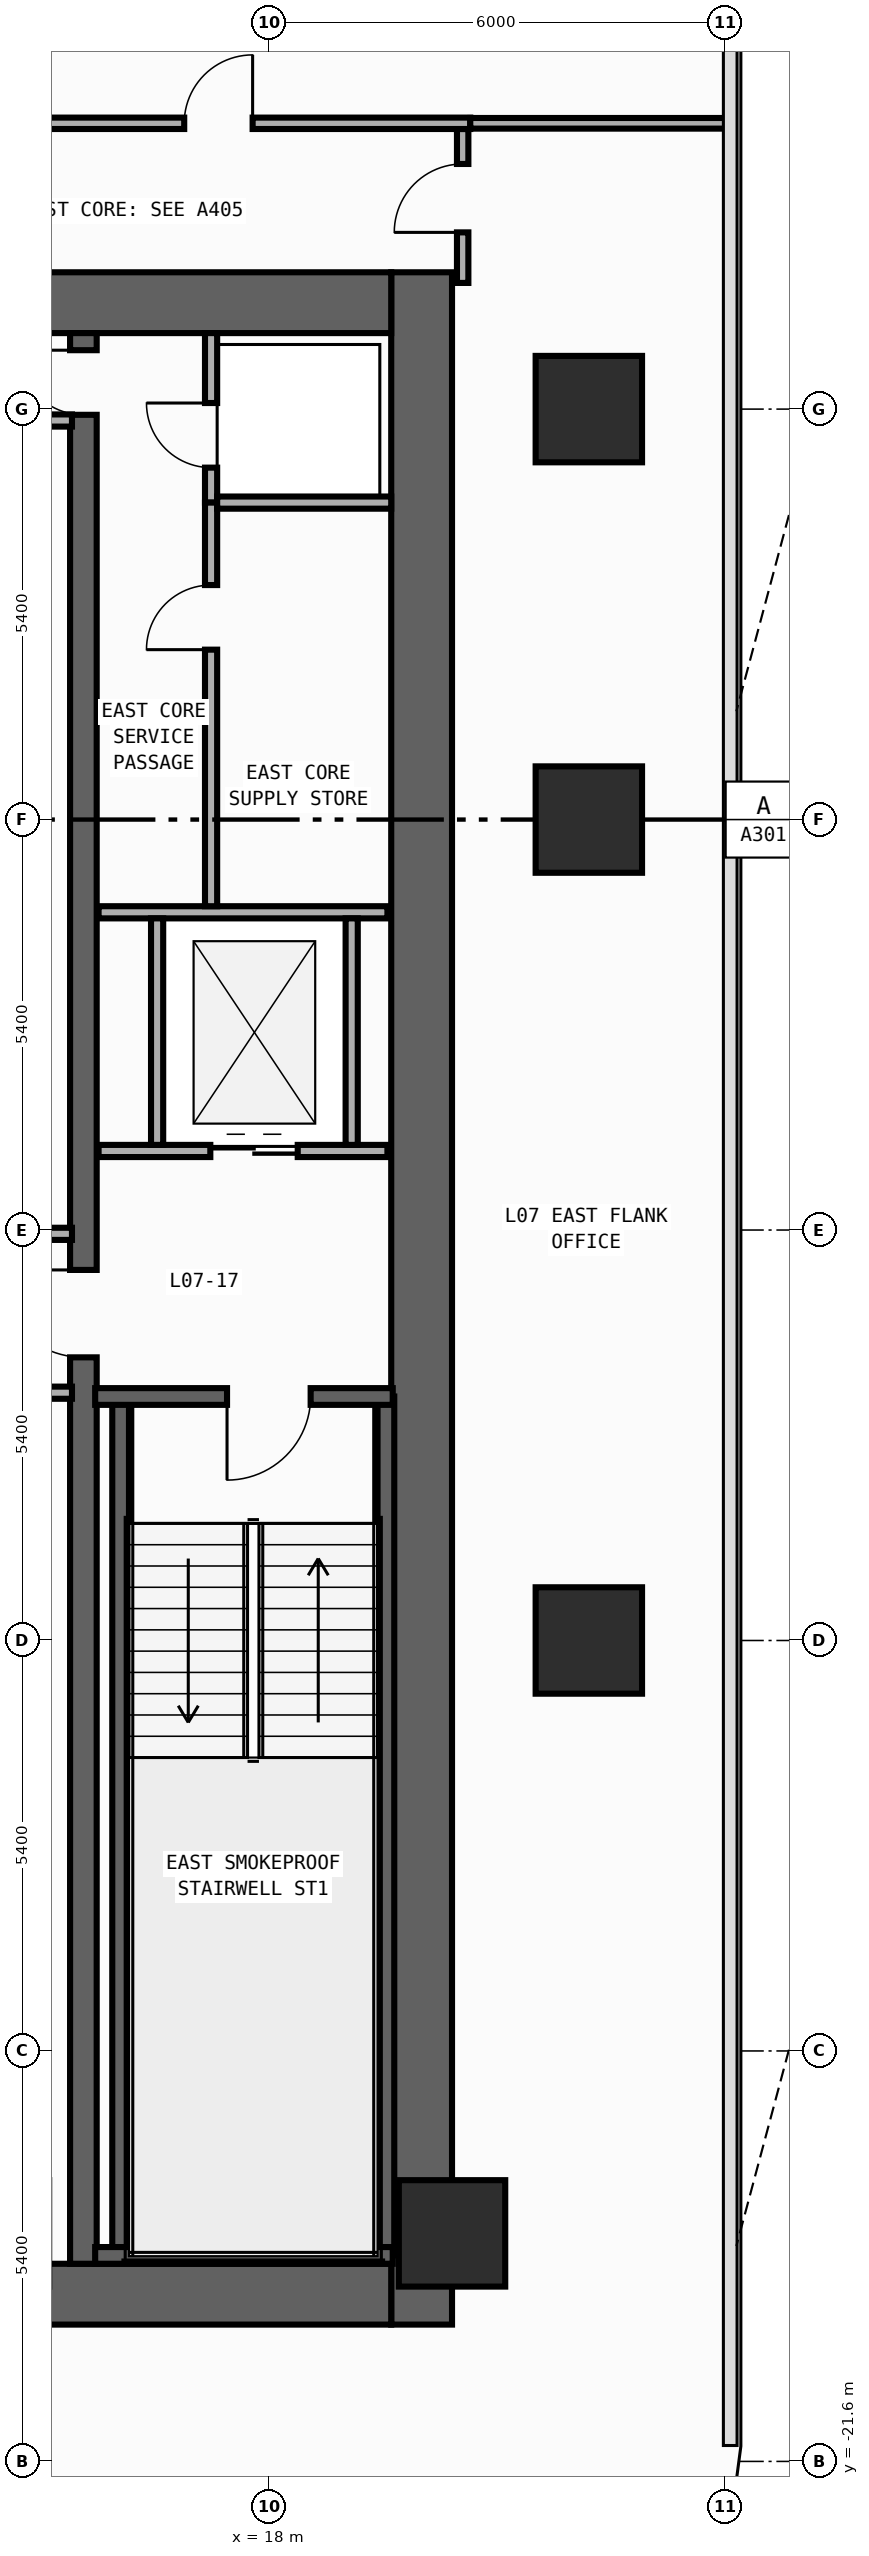
"""IFC4 building model, lengths in metres.
Left out: names, types, materials, properties, quantities, classifications, styles, units other than length and angle.
Written with IfcOpenShell. Run it as: python <this file> out.ifc"""

import sys

from ifc_helpers import new_model, si_unit, direction, frame, frame_2d, origin, origin_2d, place, context, subcontext, project, spatial, rectangle, extrude, element, fill, save


model = new_model("IFC4")
c1 = context("Model", 3, precision=1e-05, world=origin(), true_north=direction((0.0, 1.0)))
c2 = subcontext(c1, "Body", "Model", "MODEL_VIEW")
j1 = project(units=[si_unit("LENGTHUNIT", "METRE"), si_unit("PLANEANGLEUNIT", "RADIAN")], contexts=[c1])
p1 = place(None, origin())
s1 = spatial("IfcSite", under=j1, at=p1, CompositionType="ELEMENT")
p2 = place(p1, origin())
s2 = spatial("IfcBuilding", under=s1, at=p2, CompositionType="ELEMENT")
p3 = place(p2, frame((0.0, 0.0, 30.2)))
s3 = spatial("IfcBuildingStorey", under=s2, at=p3, CompositionType="ELEMENT", Elevation=30.2)
p4 = place(p3, frame((20.0, -19.8, 0.0), z_axis=(0.0, 0.0, 1.0), x_axis=(0.0, 1.0, 0.0)))
e1 = element("IfcWall", 1, at=p4, inside=s3, PredefinedType="SHEAR", context=c2, shape_type="SweptSolid", body=[
    extrude(rectangle(XDim=27.0, YDim=0.8, at=frame_2d((13.5, 0.0))), origin(), (0.0, 0.0, 1.0), 3.94),
])
for number, where, z_axis, x_axis in (
    (2, (12.8, -19.4, 0.0), (0.0, 0.0, 1.0), (1.0, 0.0, 0.0)),
    (3, (12.8, 6.8, 0.0), (0.0, 0.0, 1.0), (1.0, 0.0, 0.0)),
):
    element("IfcWall", number, at=place(p3, frame(where, z_axis=z_axis, x_axis=x_axis)), inside=s3, PredefinedType="SHEAR", context=c2, shape_type="SweptSolid", body=[
        extrude(rectangle(XDim=6.8, YDim=0.8, at=frame_2d((3.4, 0.0))), origin(), (0.0, 0.0, 1.0), 3.94),
    ])
p5 = place(p3, frame((15.55, -19.0, 0.0), z_axis=(0.0, 0.0, 1.0), x_axis=(0.0, 1.0, 0.0)))
e4 = element("IfcWall", 4, at=p5, inside=s3, PredefinedType="SHEAR", context=c2, shape_type="SweptSolid", body=[
    extrude(rectangle(XDim=25.4, YDim=0.35, at=frame_2d((12.7, 0.0))), origin(), (0.0, 0.0, 1.0), 3.94),
])
p6 = place(p5, frame((11.925, 0.0, 0.0)))
e5 = element("IfcOpeningElement", 5, at=p6, cuts=e4, PredefinedType="OPENING", context=c2, shape_type="SweptSolid", body=[
    extrude(rectangle(XDim=1.15, YDim=2.2, at=frame_2d((0.575, 1.1))), frame((0.0, 0.185, 0.0), z_axis=(0.0, -1.0, 0.0), x_axis=(1.0, 0.0, 0.0)), (0.0, 0.0, 1.0), 0.37),
])
p7 = place(p5, frame((24.325, 0.0, 0.0)))
e6 = element("IfcOpeningElement", 6, at=p7, cuts=e4, PredefinedType="OPENING", context=c2, shape_type="SweptSolid", body=[
    extrude(rectangle(XDim=0.85, YDim=2.1, at=frame_2d((0.425, 1.05))), frame((0.0, 0.185, 0.0), z_axis=(0.0, -1.0, 0.0), x_axis=(1.0, 0.0, 0.0)), (0.0, 0.0, 1.0), 0.37),
])
for number, where, z_axis, x_axis in (
    (7, (16.04, -18.89, 0.0), (0.0, 0.0, 1.0), (0.0, 1.0, 0.0)),
    (8, (19.53, -18.89, 0.0), (0.0, 0.0, 1.0), (0.0, 1.0, 0.0)),
):
    element("IfcWall", number, at=place(p3, frame(where, z_axis=z_axis, x_axis=x_axis)), inside=s3, PredefinedType="SHEAR", context=c2, shape_type="SweptSolid", body=[
        extrude(rectangle(XDim=11.3, YDim=0.22, at=frame_2d((5.65, 0.0))), origin(), (0.0, 0.0, 1.0), 3.94),
    ])
p8 = place(p3, frame((15.705, -18.89, 0.0), z_axis=(0.0, 0.0, 1.0), x_axis=(1.0, 0.0, 0.0)))
e9 = element("IfcWall", 9, at=p8, inside=s3, PredefinedType="SHEAR", context=c2, shape_type="SweptSolid", body=[
    extrude(rectangle(XDim=3.915, YDim=0.22, at=frame_2d((1.958, 0.0))), origin(), (0.0, 0.0, 1.0), 3.94),
])
p9 = place(p3, frame((19.62, -7.59, 0.0), z_axis=(0.0, 0.0, 1.0), x_axis=(-1.0, 0.0, 0.0)))
e10 = element("IfcWall", 10, at=p9, inside=s3, PredefinedType="SHEAR", context=c2, shape_type="SweptSolid", body=[
    extrude(rectangle(XDim=3.915, YDim=0.22, at=frame_2d((1.958, 0.0))), origin(), (0.0, 0.0, 1.0), 3.94),
])
p10 = place(p9, frame((1.08, 0.0, 0.0)))
e11 = element("IfcOpeningElement", 11, at=p10, cuts=e10, PredefinedType="OPENING", context=c2, shape_type="SweptSolid", body=[
    extrude(rectangle(XDim=1.1, YDim=2.2, at=frame_2d((0.55, 1.1))), frame((0.0, 0.12, 0.0), z_axis=(0.0, -1.0, 0.0), x_axis=(1.0, 0.0, 0.0)), (0.0, 0.0, 1.0), 0.24),
])
for number, where, z_axis, x_axis in (
    (12, (20.4, -18.6, 0.0), (0.0, 0.0, 1.0), (1.0, 0.0, 0.0)),
    (13, (22.2, -10.8, 0.0), (0.0, 0.0, 1.0), (1.0, 0.0, 0.0)),
    (14, (22.2, 0.0, 0.0), (0.0, 0.0, 1.0), (1.0, 0.0, 0.0)),
    (15, (22.2, 5.4, 0.0), (0.0, 0.0, 1.0), (1.0, 0.0, 0.0)),
):
    element("IfcColumn", number, at=place(p3, frame(where, z_axis=z_axis, x_axis=x_axis)), inside=s3, PredefinedType="COLUMN", context=c2, shape_type="SweptSolid", body=[
        extrude(rectangle(XDim=1.4, YDim=1.4, at=origin_2d()), origin(), (0.0, 0.0, 1.0), 4.2),
    ])
p11 = place(p3, frame((15.75, -4.36, 0.0), z_axis=(0.0, 0.0, 1.0), x_axis=(1.0, 0.0, 0.0)))
e16 = element("IfcWall", 16, at=p11, inside=s3, PredefinedType="STANDARD", context=c2, shape_type="SweptSolid", body=[
    extrude(rectangle(XDim=3.8, YDim=0.16, at=frame_2d((1.9, 0.0))), origin(), (0.0, 0.0, 1.0), 3.94),
])
p12 = place(p11, frame((1.47, 0.0, 0.0)))
e17 = element("IfcOpeningElement", 17, at=p12, cuts=e16, PredefinedType="OPENING", context=c2, shape_type="SweptSolid", body=[
    extrude(rectangle(XDim=1.15, YDim=2.2, at=frame_2d((0.575, 1.1))), frame((0.0, 0.09, 0.0), z_axis=(0.0, -1.0, 0.0), x_axis=(1.0, 0.0, 0.0)), (0.0, 0.0, 1.0), 0.18),
])
p13 = place(p3, frame((15.75, -1.22, 0.0), z_axis=(0.0, 0.0, 1.0), x_axis=(1.0, 0.0, 0.0)))
e18 = element("IfcWall", 18, at=p13, inside=s3, PredefinedType="STANDARD", context=c2, shape_type="SweptSolid", body=[
    extrude(rectangle(XDim=3.8, YDim=0.16, at=frame_2d((1.9, 0.0))), origin(), (0.0, 0.0, 1.0), 3.94),
])
for number, where, z_axis, x_axis in (
    (19, (16.52, -4.28, 0.0), (0.0, 0.0, 1.0), (0.0, 1.0, 0.0)),
    (20, (19.08, -4.28, 0.0), (0.0, 0.0, 1.0), (0.0, 1.0, 0.0)),
):
    element("IfcWall", number, at=place(p3, frame(where, z_axis=z_axis, x_axis=x_axis)), inside=s3, PredefinedType="STANDARD", context=c2, shape_type="SweptSolid", body=[
        extrude(rectangle(XDim=2.98, YDim=0.16, at=frame_2d((1.49, 0.0))), origin(), (0.0, 0.0, 1.0), 3.94),
    ])
for number, where, z_axis, x_axis in (
    (21, (12.8, -5.45, 0.0), (0.0, 0.0, 1.0), (1.0, 0.0, 0.0)),
    (22, (12.8, -7.54, 0.0), (0.0, 0.0, 1.0), (1.0, 0.0, 0.0)),
    (23, (12.8, 5.25, 0.0), (0.0, 0.0, 1.0), (1.0, 0.0, 0.0)),
):
    element("IfcWall", number, at=place(p3, frame(where, z_axis=z_axis, x_axis=x_axis)), inside=s3, PredefinedType="STANDARD", context=c2, shape_type="SweptSolid", body=[
        extrude(rectangle(XDim=2.6, YDim=0.16, at=frame_2d((1.3, 0.0))), origin(), (0.0, 0.0, 1.0), 3.94),
    ])
p14 = place(p3, frame((17.23, 4.17, 0.0), z_axis=(0.0, 0.0, 1.0), x_axis=(0.0, 1.0, 0.0)))
e24 = element("IfcWall", 24, at=p14, inside=s3, PredefinedType="PARTITIONING", context=c2, shape_type="SweptSolid", body=[
    extrude(rectangle(XDim=2.23, YDim=0.16, at=frame_2d((1.115, 0.0))), origin(), (0.0, 0.0, 1.0), 3.94),
])
p15 = place(p14, frame((0.46, 0.0, 0.0)))
e25 = element("IfcOpeningElement", 25, at=p15, cuts=e24, PredefinedType="OPENING", context=c2, shape_type="SweptSolid", body=[
    extrude(rectangle(XDim=0.85, YDim=2.1, at=frame_2d((0.425, 1.05))), frame((0.0, 0.09, 0.0), z_axis=(0.0, -1.0, 0.0), x_axis=(1.0, 0.0, 0.0)), (0.0, 0.0, 1.0), 0.18),
])
p16 = place(p3, frame((17.23, -1.14, 0.0), z_axis=(0.0, 0.0, 1.0), x_axis=(0.0, 1.0, 0.0)))
e26 = element("IfcWall", 26, at=p16, inside=s3, PredefinedType="PARTITIONING", context=c2, shape_type="SweptSolid", body=[
    extrude(rectangle(XDim=5.31, YDim=0.16, at=frame_2d((2.655, 0.0))), origin(), (0.0, 0.0, 1.0), 3.94),
])
p17 = place(p16, frame((3.375, 0.0, 0.0)))
e27 = element("IfcOpeningElement", 27, at=p17, cuts=e26, PredefinedType="OPENING", context=c2, shape_type="SweptSolid", body=[
    extrude(rectangle(XDim=0.85, YDim=2.1, at=frame_2d((0.425, 1.05))), frame((0.0, 0.09, 0.0), z_axis=(0.0, -1.0, 0.0), x_axis=(1.0, 0.0, 0.0)), (0.0, 0.0, 1.0), 0.18),
])
p18 = place(p3, frame((17.31, 4.17, 0.0), z_axis=(0.0, 0.0, 1.0), x_axis=(1.0, 0.0, 0.0)))
e28 = element("IfcWall", 28, at=p18, inside=s3, PredefinedType="PARTITIONING", context=c2, shape_type="SweptSolid", body=[
    extrude(rectangle(XDim=2.29, YDim=0.16, at=frame_2d((1.145, 0.0))), origin(), (0.0, 0.0, 1.0), 3.94),
])
p19 = place(p3, frame((20.54, 7.06, 0.0), z_axis=(0.0, 0.0, 1.0), x_axis=(0.0, 1.0, 0.0)))
e29 = element("IfcWall", 29, at=p19, inside=s3, PredefinedType="PARTITIONING", context=c2, shape_type="SweptSolid", body=[
    extrude(rectangle(XDim=2.025, YDim=0.15, at=frame_2d((1.012, 0.0))), origin(), (0.0, 0.0, 1.0), 3.94),
])
p20 = place(p19, frame((0.665, 0.0, 0.0)))
e30 = element("IfcOpeningElement", 30, at=p20, cuts=e29, PredefinedType="OPENING", context=c2, shape_type="SweptSolid", body=[
    extrude(rectangle(XDim=0.9, YDim=2.15, at=frame_2d((0.45, 1.075))), frame((0.0, 0.085, 0.0), z_axis=(0.0, -1.0, 0.0), x_axis=(1.0, 0.0, 0.0)), (0.0, 0.0, 1.0), 0.17),
])
p21 = place(p3, frame((11.81, 9.16, 0.0), z_axis=(0.0, 0.0, 1.0), x_axis=(1.0, 0.0, 0.0)))
e31 = element("IfcWall", 31, at=p21, inside=s3, PredefinedType="PARTITIONING", context=c2, shape_type="SweptSolid", body=[
    extrude(rectangle(XDim=8.83, YDim=0.15, at=frame_2d((4.415, 0.0))), origin(), (0.0, 0.0, 1.0), 3.94),
])
p22 = place(p21, frame((5.067, 0.0, 0.0)))
e32 = element("IfcOpeningElement", 32, at=p22, cuts=e31, PredefinedType="OPENING", context=c2, shape_type="SweptSolid", body=[
    extrude(rectangle(XDim=0.9, YDim=2.15, at=frame_2d((0.45, 1.075))), frame((0.0, 0.085, 0.0), z_axis=(0.0, -1.0, 0.0), x_axis=(1.0, 0.0, 0.0)), (0.0, 0.0, 1.0), 0.17),
])
p23 = place(p3, frame((20.64, 9.16, 0.0), z_axis=(0.0, 0.0, 1.0), x_axis=(1.0, 0.0, 0.0)))
e33 = element("IfcWall", 33, at=p23, inside=s3, PredefinedType="PARTITIONING", context=c2, shape_type="SweptSolid", body=[
    extrude(rectangle(XDim=3.415, YDim=0.14, at=frame_2d((1.708, 0.0))), origin(), (0.0, 0.0, 1.0), 3.94),
])
p24 = place(p10, origin())
e34 = element("IfcDoor", 34, at=p24, inside=s3, OperationType="SINGLE_SWING_RIGHT", PredefinedType="DOOR", context=c2, shape_type="SweptSolid", body=[
    extrude(rectangle(XDim=1.1, YDim=2.2, at=frame_2d((0.55, 1.1))), frame((0.0, 0.025, 0.0), z_axis=(0.0, -1.0, 0.0), x_axis=(1.0, 0.0, 0.0)), (0.0, 0.0, 1.0), 0.05),
])
fill(e11, e34)
p25 = place(p6, origin())
e35 = element("IfcDoor", 35, at=p25, inside=s3, OperationType="SINGLE_SWING_RIGHT", PredefinedType="DOOR", context=c2, shape_type="SweptSolid", body=[
    extrude(rectangle(XDim=1.15, YDim=2.2, at=frame_2d((0.575, 1.1))), frame((0.0, 0.025, 0.0), z_axis=(0.0, -1.0, 0.0), x_axis=(1.0, 0.0, 0.0)), (0.0, 0.0, 1.0), 0.05),
])
fill(e5, e35)
p26 = place(p7, origin())
e36 = element("IfcDoor", 36, at=p26, inside=s3, OperationType="SINGLE_SWING_RIGHT", PredefinedType="DOOR", context=c2, shape_type="SweptSolid", body=[
    extrude(rectangle(XDim=0.85, YDim=2.1, at=frame_2d((0.425, 1.05))), frame((0.0, 0.025, 0.0), z_axis=(0.0, -1.0, 0.0), x_axis=(1.0, 0.0, 0.0)), (0.0, 0.0, 1.0), 0.05),
])
fill(e6, e36)
p27 = place(p12, origin())
e37 = element("IfcDoor", 37, at=p27, inside=s3, OperationType="DOUBLE_DOOR_SLIDING", PredefinedType="DOOR", context=c2, shape_type="SweptSolid", body=[
    extrude(rectangle(XDim=1.15, YDim=2.2, at=frame_2d((0.575, 1.1))), frame((0.0, 0.025, 0.0), z_axis=(0.0, -1.0, 0.0), x_axis=(1.0, 0.0, 0.0)), (0.0, 0.0, 1.0), 0.05),
])
fill(e17, e37)
p28 = place(p15, origin())
e38 = element("IfcDoor", 38, at=p28, inside=s3, OperationType="SINGLE_SWING_RIGHT", PredefinedType="DOOR", context=c2, shape_type="SweptSolid", body=[
    extrude(rectangle(XDim=0.85, YDim=2.1, at=frame_2d((0.425, 1.05))), frame((0.0, 0.025, 0.0), z_axis=(0.0, -1.0, 0.0), x_axis=(1.0, 0.0, 0.0)), (0.0, 0.0, 1.0), 0.05),
])
fill(e25, e38)
p29 = place(p17, origin())
e39 = element("IfcDoor", 39, at=p29, inside=s3, OperationType="SINGLE_SWING_LEFT", PredefinedType="DOOR", context=c2, shape_type="SweptSolid", body=[
    extrude(rectangle(XDim=0.85, YDim=2.1, at=frame_2d((0.425, 1.05))), frame((0.0, 0.025, 0.0), z_axis=(0.0, -1.0, 0.0), x_axis=(1.0, 0.0, 0.0)), (0.0, 0.0, 1.0), 0.05),
])
fill(e27, e39)
p30 = place(p20, origin())
e40 = element("IfcDoor", 40, at=p30, inside=s3, OperationType="SINGLE_SWING_LEFT", PredefinedType="DOOR", context=c2, shape_type="SweptSolid", body=[
    extrude(rectangle(XDim=0.9, YDim=2.15, at=frame_2d((0.45, 1.075))), frame((0.0, 0.025, 0.0), z_axis=(0.0, -1.0, 0.0), x_axis=(1.0, 0.0, 0.0)), (0.0, 0.0, 1.0), 0.05),
])
fill(e30, e40)
p31 = place(p22, origin())
e41 = element("IfcDoor", 41, at=p31, inside=s3, OperationType="SINGLE_SWING_RIGHT", PredefinedType="DOOR", context=c2, shape_type="SweptSolid", body=[
    extrude(rectangle(XDim=0.9, YDim=2.15, at=frame_2d((0.45, 1.075))), frame((0.0, 0.025, 0.0), z_axis=(0.0, -1.0, 0.0), x_axis=(1.0, 0.0, 0.0)), (0.0, 0.0, 1.0), 0.05),
])
fill(e32, e41)
save(model, sys.argv[1])
